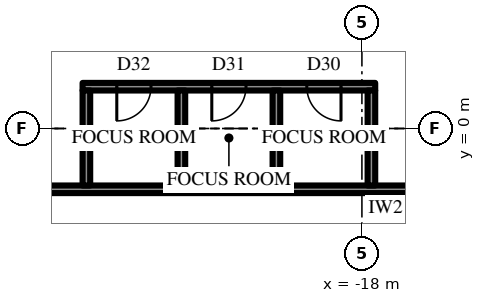
"""IFC4 building model, lengths in metres.
Left out: names, types, materials, properties, quantities, classifications, styles, units other than length and angle.
Written with IfcOpenShell. Run it as: python <this file> out.ifc"""

import sys

from ifc_helpers import new_model, si_unit, direction, frame, frame_2d, origin, place, context, subcontext, project, spatial, rectangle, extrude, element, fill, save


model = new_model("IFC4")
c1 = context("Model", 3, precision=1e-05, world=origin(), true_north=direction((0.0, 1.0)))
c2 = subcontext(c1, "Body", "Model", "MODEL_VIEW")
j1 = project(units=[si_unit("LENGTHUNIT", "METRE"), si_unit("PLANEANGLEUNIT", "RADIAN")], contexts=[c1])
p1 = place(None, origin())
s1 = spatial("IfcSite", under=j1, at=p1, CompositionType="ELEMENT")
p2 = place(p1, origin())
s2 = spatial("IfcBuilding", under=s1, at=p2, CompositionType="ELEMENT")
p3 = place(p2, frame((0.0, 0.0, 353.5)))
s3 = spatial("IfcBuildingStorey", under=s2, at=p3, CompositionType="ELEMENT", Elevation=353.5)
p4 = place(p3, frame((-29.459, -2.175, 0.0), z_axis=(0.0, 0.0, 1.0), x_axis=(0.499996453679, -0.866027451244, 0.0)))
e1 = element("IfcWall", 1, at=p4, inside=s3, PredefinedType="SOLIDWALL", context=c2, shape_type="SweptSolid", body=[
    extrude(rectangle(XDim=9.564, YDim=0.3, at=frame_2d((4.782, 0.0))), origin(), (0.0, 0.0, 1.0), 2.9),
])
p5 = place(p4, frame((0.866, 0.0, 0.6)))
e2 = element("IfcOpeningElement", 2, at=p5, cuts=e1, PredefinedType="OPENING", context=c2, shape_type="SweptSolid", body=[
    extrude(rectangle(XDim=2.55, YDim=2.05, at=frame_2d((1.275, 1.025))), frame((0.0, 0.16, 0.0), z_axis=(0.0, -1.0, 0.0), x_axis=(1.0, 0.0, 0.0)), (0.0, 0.0, 1.0), 0.32),
])
p6 = place(p4, frame((5.823, 0.0, 0.0)))
e3 = element("IfcOpeningElement", 3, at=p6, cuts=e1, PredefinedType="OPENING", context=c2, shape_type="SweptSolid", body=[
    extrude(rectangle(XDim=1.2, YDim=2.4, at=frame_2d((0.6, 1.2))), frame((0.0, 0.16, 0.0), z_axis=(0.0, -1.0, 0.0), x_axis=(1.0, 0.0, 0.0)), (0.0, 0.0, 1.0), 0.32),
])
p7 = place(p3, frame((-12.425, -1.6, 0.0), z_axis=(0.0, 0.0, 1.0), x_axis=(-1.0, 0.0, 0.0)))
e4 = element("IfcWall", 4, at=p7, inside=s3, PredefinedType="PARTITIONING", context=c2, shape_type="SweptSolid", body=[
    extrude(rectangle(XDim=16.5, YDim=0.2, at=frame_2d((8.25, 0.0))), origin(), (0.0, 0.0, 1.0), 4.0),
])
p8 = place(p7, frame((1.15, 0.0, 0.0)))
e5 = element("IfcOpeningElement", 5, at=p8, cuts=e4, PredefinedType="OPENING", context=c2, shape_type="SweptSolid", body=[
    extrude(rectangle(XDim=1.0, YDim=2.2, at=frame_2d((0.5, 1.1))), frame((0.0, 0.11, 0.0), z_axis=(0.0, -1.0, 0.0), x_axis=(1.0, 0.0, 0.0)), (0.0, 0.0, 1.0), 0.22),
])
p9 = place(p3, frame((-17.65, 1.1, 0.0), z_axis=(0.0, 0.0, 1.0), x_axis=(-1.0, 0.0, 0.0)))
e6 = element("IfcWall", 6, at=p9, inside=s3, PredefinedType="PARTITIONING", context=c2, shape_type="SweptSolid", body=[
    extrude(rectangle(XDim=7.7, YDim=0.2, at=frame_2d((3.85, 0.0))), origin(), (0.0, 0.0, 1.0), 4.0),
])
p10 = place(p9, frame((0.9, 0.0, 0.0)))
e7 = element("IfcOpeningElement", 7, at=p10, cuts=e6, PredefinedType="OPENING", context=c2, shape_type="SweptSolid", body=[
    extrude(rectangle(XDim=0.9, YDim=2.2, at=frame_2d((0.45, 1.1))), frame((0.0, 0.11, 0.0), z_axis=(0.0, -1.0, 0.0), x_axis=(1.0, 0.0, 0.0)), (0.0, 0.0, 1.0), 0.22),
])
p11 = place(p9, frame((3.4, 0.0, 0.0)))
e8 = element("IfcOpeningElement", 8, at=p11, cuts=e6, PredefinedType="OPENING", context=c2, shape_type="SweptSolid", body=[
    extrude(rectangle(XDim=0.9, YDim=2.2, at=frame_2d((0.45, 1.1))), frame((0.0, 0.11, 0.0), z_axis=(0.0, -1.0, 0.0), x_axis=(1.0, 0.0, 0.0)), (0.0, 0.0, 1.0), 0.22),
])
p12 = place(p9, frame((5.9, 0.0, 0.0)))
e9 = element("IfcOpeningElement", 9, at=p12, cuts=e6, PredefinedType="OPENING", context=c2, shape_type="SweptSolid", body=[
    extrude(rectangle(XDim=0.9, YDim=2.2, at=frame_2d((0.45, 1.1))), frame((0.0, 0.11, 0.0), z_axis=(0.0, -1.0, 0.0), x_axis=(1.0, 0.0, 0.0)), (0.0, 0.0, 1.0), 0.22),
])
for number, where, z_axis, x_axis in (
    (10, (-17.75, -1.5, 0.0), (0.0, 0.0, 1.0), (0.0, 1.0, 0.0)),
    (11, (-20.25, -1.5, 0.0), (0.0, 0.0, 1.0), (0.0, 1.0, 0.0)),
    (12, (-22.75, -1.5, 0.0), (0.0, 0.0, 1.0), (0.0, 1.0, 0.0)),
    (13, (-25.25, -1.5, 0.0), (0.0, 0.0, 1.0), (0.0, 1.0, 0.0)),
):
    element("IfcWall", number, at=place(p3, frame(where, z_axis=z_axis, x_axis=x_axis)), inside=s3, PredefinedType="PARTITIONING", context=c2, shape_type="SweptSolid", body=[
        extrude(rectangle(XDim=2.5, YDim=0.2, at=frame_2d((1.25, 0.0))), origin(), (0.0, 0.0, 1.0), 4.0),
    ])
p13 = place(p10, origin())
e14 = element("IfcDoor", 14, at=p13, inside=s3, OperationType="SINGLE_SWING_RIGHT", PredefinedType="DOOR", context=c2, shape_type="SweptSolid", body=[
    extrude(rectangle(XDim=0.9, YDim=2.2, at=frame_2d((0.45, 1.1))), frame((0.0, 0.025, 0.0), z_axis=(0.0, -1.0, 0.0), x_axis=(1.0, 0.0, 0.0)), (0.0, 0.0, 1.0), 0.05),
])
fill(e7, e14)
p14 = place(p11, origin())
e15 = element("IfcDoor", 15, at=p14, inside=s3, OperationType="SINGLE_SWING_LEFT", PredefinedType="DOOR", context=c2, shape_type="SweptSolid", body=[
    extrude(rectangle(XDim=0.9, YDim=2.2, at=frame_2d((0.45, 1.1))), frame((0.0, 0.025, 0.0), z_axis=(0.0, -1.0, 0.0), x_axis=(1.0, 0.0, 0.0)), (0.0, 0.0, 1.0), 0.05),
])
fill(e8, e15)
p15 = place(p12, origin())
e16 = element("IfcDoor", 16, at=p15, inside=s3, OperationType="SINGLE_SWING_LEFT", PredefinedType="DOOR", context=c2, shape_type="SweptSolid", body=[
    extrude(rectangle(XDim=0.9, YDim=2.2, at=frame_2d((0.45, 1.1))), frame((0.0, 0.025, 0.0), z_axis=(0.0, -1.0, 0.0), x_axis=(1.0, 0.0, 0.0)), (0.0, 0.0, 1.0), 0.05),
])
fill(e9, e16)
save(model, sys.argv[1])
